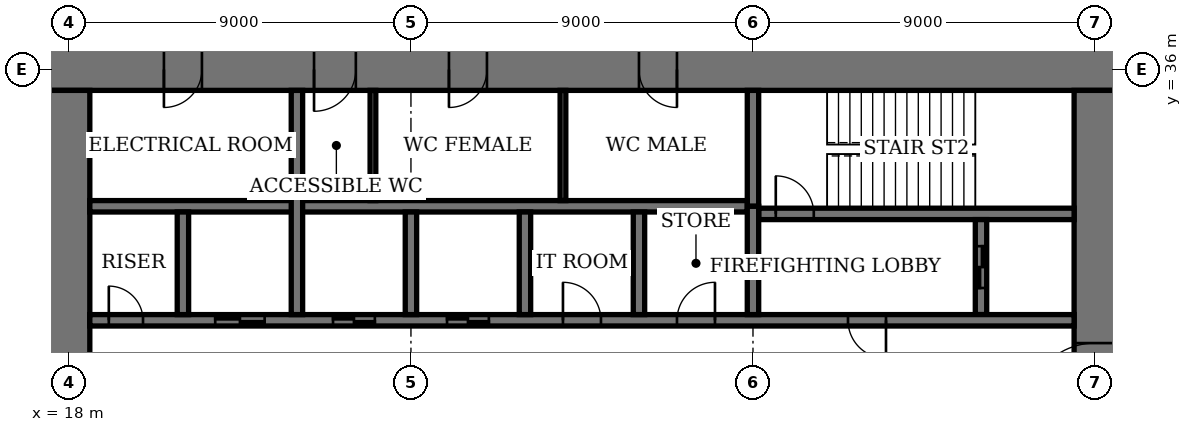
"""IFC4 building model, lengths in metres.
Left out: names, types, materials, properties, quantities, classifications, styles, units other than length and angle.
Written with IfcOpenShell. Run it as: python <this file> out.ifc"""

import sys

from ifc_helpers import new_model, si_unit, direction, frame, frame_2d, origin, place, context, subcontext, project, spatial, rectangle, extrude, element, fill, save


model = new_model("IFC4")
c1 = context("Model", 3, precision=1e-05, world=origin(), true_north=direction((0.0, 1.0)))
c2 = subcontext(c1, "Body", "Model", "MODEL_VIEW")
j1 = project(units=[si_unit("LENGTHUNIT", "METRE"), si_unit("PLANEANGLEUNIT", "RADIAN")], contexts=[c1])
p1 = place(None, origin())
s1 = spatial("IfcSite", under=j1, at=p1, CompositionType="ELEMENT")
p2 = place(p1, origin())
s2 = spatial("IfcBuilding", under=s1, at=p2, CompositionType="ELEMENT")
p3 = place(p2, frame((0.0, 0.0, 202.2)))
s3 = spatial("IfcBuildingStorey", under=s2, at=p3, CompositionType="ELEMENT", Elevation=202.2)
p4 = place(p3, frame((45.55, 36.0, 0.0), z_axis=(0.0, 0.0, 1.0), x_axis=(-1.0, 0.0, 0.0)))
e1 = element("IfcWall", 1, at=p4, inside=s3, PredefinedType="SHEAR", context=c2, shape_type="SweptSolid", body=[
    extrude(rectangle(XDim=28.1, YDim=1.1, at=frame_2d((14.05, 0.0))), origin(), (0.0, 0.0, 1.0), 4.0),
])
p5 = place(p4, frame((11.55, 0.0, 0.0)))
e2 = element("IfcOpeningElement", 2, at=p5, cuts=e1, PredefinedType="OPENING", context=c2, shape_type="SweptSolid", body=[
    extrude(rectangle(XDim=1.0, YDim=2.4, at=frame_2d((0.5, 1.2))), frame((0.0, 0.56, 0.0), z_axis=(0.0, -1.0, 0.0), x_axis=(1.0, 0.0, 0.0)), (0.0, 0.0, 1.0), 1.12),
])
p6 = place(p4, frame((16.55, 0.0, 0.0)))
e3 = element("IfcOpeningElement", 3, at=p6, cuts=e1, PredefinedType="OPENING", context=c2, shape_type="SweptSolid", body=[
    extrude(rectangle(XDim=1.0, YDim=2.4, at=frame_2d((0.5, 1.2))), frame((0.0, 0.56, 0.0), z_axis=(0.0, -1.0, 0.0), x_axis=(1.0, 0.0, 0.0)), (0.0, 0.0, 1.0), 1.12),
])
p7 = place(p4, frame((20.0, 0.0, 0.0)))
e4 = element("IfcOpeningElement", 4, at=p7, cuts=e1, PredefinedType="OPENING", context=c2, shape_type="SweptSolid", body=[
    extrude(rectangle(XDim=1.1, YDim=2.4, at=frame_2d((0.55, 1.2))), frame((0.0, 0.56, 0.0), z_axis=(0.0, -1.0, 0.0), x_axis=(1.0, 0.0, 0.0)), (0.0, 0.0, 1.0), 1.12),
])
p8 = place(p4, frame((24.05, 0.0, 0.0)))
e5 = element("IfcOpeningElement", 5, at=p8, cuts=e1, PredefinedType="OPENING", context=c2, shape_type="SweptSolid", body=[
    extrude(rectangle(XDim=1.0, YDim=2.4, at=frame_2d((0.5, 1.2))), frame((0.0, 0.56, 0.0), z_axis=(0.0, -1.0, 0.0), x_axis=(1.0, 0.0, 0.0)), (0.0, 0.0, 1.0), 1.12),
])
p9 = place(p3, frame((18.0, 35.45, 0.0), z_axis=(0.0, 0.0, 1.0), x_axis=(0.0, -1.0, 0.0)))
e6 = element("IfcWall", 6, at=p9, inside=s3, PredefinedType="SHEAR", context=c2, shape_type="SweptSolid", body=[
    extrude(rectangle(XDim=16.9, YDim=1.1, at=frame_2d((8.45, 0.0))), origin(), (0.0, 0.0, 1.0), 4.0),
])
p10 = place(p9, frame((8.45, 0.0, 0.0)))
e7 = element("IfcOpeningElement", 7, at=p10, cuts=e6, PredefinedType="OPENING", context=c2, shape_type="SweptSolid", body=[
    extrude(rectangle(XDim=1.8, YDim=2.4, at=frame_2d((0.9, 1.2))), frame((0.0, 0.56, 0.0), z_axis=(0.0, -1.0, 0.0), x_axis=(1.0, 0.0, 0.0)), (0.0, 0.0, 1.0), 1.12),
])
p11 = place(p3, frame((45.0, 18.55, 0.0), z_axis=(0.0, 0.0, 1.0), x_axis=(0.0, 1.0, 0.0)))
e8 = element("IfcWall", 8, at=p11, inside=s3, PredefinedType="SHEAR", context=c2, shape_type="SweptSolid", body=[
    extrude(rectangle(XDim=16.9, YDim=1.1, at=frame_2d((8.45, 0.0))), origin(), (0.0, 0.0, 1.0), 4.0),
])
p12 = place(p11, frame((8.45, 0.0, 0.0)))
e9 = element("IfcOpeningElement", 9, at=p12, cuts=e8, PredefinedType="OPENING", context=c2, shape_type="SweptSolid", body=[
    extrude(rectangle(XDim=1.8, YDim=2.4, at=frame_2d((0.9, 1.2))), frame((0.0, 0.56, 0.0), z_axis=(0.0, -1.0, 0.0), x_axis=(1.0, 0.0, 0.0)), (0.0, 0.0, 1.0), 1.12),
])
p13 = place(p3, frame((36.15, 32.2, 0.0), z_axis=(0.0, 0.0, 1.0), x_axis=(1.0, 0.0, 0.0)))
e10 = element("IfcWall", 10, at=p13, inside=s3, PredefinedType="SHEAR", context=c2, shape_type="SweptSolid", body=[
    extrude(rectangle(XDim=8.3, YDim=0.3, at=frame_2d((4.15, 0.0))), origin(), (0.0, 0.0, 1.0), 4.0),
])
p14 = place(p13, frame((0.45, 0.0, 0.0)))
e11 = element("IfcOpeningElement", 11, at=p14, cuts=e10, PredefinedType="OPENING", context=c2, shape_type="SweptSolid", body=[
    extrude(rectangle(XDim=1.0, YDim=2.4, at=frame_2d((0.5, 1.2))), frame((0.0, 0.16, 0.0), z_axis=(0.0, -1.0, 0.0), x_axis=(1.0, 0.0, 0.0)), (0.0, 0.0, 1.0), 0.32),
])
p15 = place(p3, frame((36.0, 32.4, 0.0), z_axis=(0.0, 0.0, 1.0), x_axis=(0.0, 1.0, 0.0)))
e12 = element("IfcWall", 12, at=p15, inside=s3, PredefinedType="SHEAR", context=c2, shape_type="SweptSolid", body=[
    extrude(rectangle(XDim=3.05, YDim=0.3, at=frame_2d((1.525, 0.0))), origin(), (0.0, 0.0, 1.0), 4.0),
])
p16 = place(p3, frame((42.0, 29.55, 0.0), z_axis=(0.0, 0.0, 1.0), x_axis=(0.0, 1.0, 0.0)))
e13 = element("IfcWall", 13, at=p16, inside=s3, PredefinedType="SHEAR", context=c2, shape_type="SweptSolid", body=[
    extrude(rectangle(XDim=2.5, YDim=0.3, at=frame_2d((1.25, 0.0))), origin(), (0.0, 0.0, 1.0), 4.0),
])
p17 = place(p16, frame((0.7, 0.0, 0.0)))
e14 = element("IfcOpeningElement", 14, at=p17, cuts=e13, PredefinedType="OPENING", context=c2, shape_type="SweptSolid", body=[
    extrude(rectangle(XDim=1.1, YDim=2.4, at=frame_2d((0.55, 1.2))), frame((0.0, 0.16, 0.0), z_axis=(0.0, -1.0, 0.0), x_axis=(1.0, 0.0, 0.0)), (0.0, 0.0, 1.0), 0.32),
])
p18 = place(p3, frame((18.55, 29.4, 0.0), z_axis=(0.0, 0.0, 1.0), x_axis=(1.0, 0.0, 0.0)))
e15 = element("IfcWall", 15, at=p18, inside=s3, PredefinedType="SHEAR", context=c2, shape_type="SweptSolid", body=[
    extrude(rectangle(XDim=25.9, YDim=0.3, at=frame_2d((12.95, 0.0))), origin(), (0.0, 0.0, 1.0), 4.0),
])
p19 = place(p18, frame((19.95, 0.0, 0.0)))
e16 = element("IfcOpeningElement", 16, at=p19, cuts=e15, PredefinedType="OPENING", context=c2, shape_type="SweptSolid", body=[
    extrude(rectangle(XDim=1.0, YDim=2.4, at=frame_2d((0.5, 1.2))), frame((0.0, 0.16, 0.0), z_axis=(0.0, -1.0, 0.0), x_axis=(1.0, 0.0, 0.0)), (0.0, 0.0, 1.0), 0.32),
])
p20 = place(p18, frame((0.5, 0.0, 0.0)))
e17 = element("IfcOpeningElement", 17, at=p20, cuts=e15, PredefinedType="OPENING", context=c2, shape_type="SweptSolid", body=[
    extrude(rectangle(XDim=0.9, YDim=2.1, at=frame_2d((0.45, 1.05))), frame((0.0, 0.16, 0.0), z_axis=(0.0, -1.0, 0.0), x_axis=(1.0, 0.0, 0.0)), (0.0, 0.0, 1.0), 0.32),
])
p21 = place(p18, frame((15.45, 0.0, 0.0)))
e18 = element("IfcOpeningElement", 18, at=p21, cuts=e15, PredefinedType="OPENING", context=c2, shape_type="SweptSolid", body=[
    extrude(rectangle(XDim=1.0, YDim=2.4, at=frame_2d((0.5, 1.2))), frame((0.0, 0.16, 0.0), z_axis=(0.0, -1.0, 0.0), x_axis=(1.0, 0.0, 0.0)), (0.0, 0.0, 1.0), 0.32),
])
p22 = place(p18, frame((12.45, 0.0, 0.0)))
e19 = element("IfcOpeningElement", 19, at=p22, cuts=e15, PredefinedType="OPENING", context=c2, shape_type="SweptSolid", body=[
    extrude(rectangle(XDim=1.0, YDim=2.4, at=frame_2d((0.5, 1.2))), frame((0.0, 0.16, 0.0), z_axis=(0.0, -1.0, 0.0), x_axis=(1.0, 0.0, 0.0)), (0.0, 0.0, 1.0), 0.32),
])
p23 = place(p18, frame((9.4, 0.0, 0.0)))
e20 = element("IfcOpeningElement", 20, at=p23, cuts=e15, PredefinedType="OPENING", context=c2, shape_type="SweptSolid", body=[
    extrude(rectangle(XDim=1.1, YDim=2.4, at=frame_2d((0.55, 1.2))), frame((0.0, 0.16, 0.0), z_axis=(0.0, -1.0, 0.0), x_axis=(1.0, 0.0, 0.0)), (0.0, 0.0, 1.0), 0.32),
])
p24 = place(p18, frame((6.4, 0.0, 0.0)))
e21 = element("IfcOpeningElement", 21, at=p24, cuts=e15, PredefinedType="OPENING", context=c2, shape_type="SweptSolid", body=[
    extrude(rectangle(XDim=1.1, YDim=2.4, at=frame_2d((0.55, 1.2))), frame((0.0, 0.16, 0.0), z_axis=(0.0, -1.0, 0.0), x_axis=(1.0, 0.0, 0.0)), (0.0, 0.0, 1.0), 0.32),
])
p25 = place(p18, frame((3.3, 0.0, 0.0)))
e22 = element("IfcOpeningElement", 22, at=p25, cuts=e15, PredefinedType="OPENING", context=c2, shape_type="SweptSolid", body=[
    extrude(rectangle(XDim=1.3, YDim=2.4, at=frame_2d((0.65, 1.2))), frame((0.0, 0.16, 0.0), z_axis=(0.0, -1.0, 0.0), x_axis=(1.0, 0.0, 0.0)), (0.0, 0.0, 1.0), 0.32),
])
p26 = place(p3, frame((18.55, 32.4, 0.0), z_axis=(0.0, 0.0, 1.0), x_axis=(1.0, 0.0, 0.0)))
e23 = element("IfcWall", 23, at=p26, inside=s3, PredefinedType="SHEAR", context=c2, shape_type="SweptSolid", body=[
    extrude(rectangle(XDim=17.3, YDim=0.3, at=frame_2d((8.65, 0.0))), origin(), (0.0, 0.0, 1.0), 4.0),
])
for number, where, z_axis, x_axis in (
    (24, (33.0, 29.55, 0.0), (0.0, 0.0, 1.0), (0.0, 1.0, 0.0)),
    (25, (30.0, 29.55, 0.0), (0.0, 0.0, 1.0), (0.0, 1.0, 0.0)),
    (26, (27.0, 29.55, 0.0), (0.0, 0.0, 1.0), (0.0, 1.0, 0.0)),
):
    element("IfcWall", number, at=place(p3, frame(where, z_axis=z_axis, x_axis=x_axis)), inside=s3, PredefinedType="SHEAR", context=c2, shape_type="SweptSolid", body=[
        extrude(rectangle(XDim=2.7, YDim=0.3, at=frame_2d((1.35, 0.0))), origin(), (0.0, 0.0, 1.0), 4.0),
    ])
p27 = place(p3, frame((24.0, 29.55, 0.0), z_axis=(0.0, 0.0, 1.0), x_axis=(0.0, 1.0, 0.0)))
e27 = element("IfcWall", 27, at=p27, inside=s3, PredefinedType="SHEAR", context=c2, shape_type="SweptSolid", body=[
    extrude(rectangle(XDim=5.9, YDim=0.3, at=frame_2d((2.95, 0.0))), origin(), (0.0, 0.0, 1.0), 4.0),
])
p28 = place(p3, frame((21.0, 29.55, 0.0), z_axis=(0.0, 0.0, 1.0), x_axis=(0.0, 1.0, 0.0)))
e28 = element("IfcWall", 28, at=p28, inside=s3, PredefinedType="SHEAR", context=c2, shape_type="SweptSolid", body=[
    extrude(rectangle(XDim=2.7, YDim=0.3, at=frame_2d((1.35, 0.0))), origin(), (0.0, 0.0, 1.0), 4.0),
])
p29 = place(p3, frame((36.0, 29.55, 0.0), z_axis=(0.0, 0.0, 1.0), x_axis=(0.0, 1.0, 0.0)))
e29 = element("IfcWall", 29, at=p29, inside=s3, PredefinedType="SHEAR", context=c2, shape_type="SweptSolid", body=[
    extrude(rectangle(XDim=2.85, YDim=0.3, at=frame_2d((1.425, 0.0))), origin(), (0.0, 0.0, 1.0), 4.0),
])
for number, where, z_axis, x_axis in (
    (30, (31.0, 32.55, 0.0), (0.0, 0.0, 1.0), (0.0, 1.0, 0.0)),
    (31, (26.0, 32.55, 0.0), (0.0, 0.0, 1.0), (0.0, 1.0, 0.0)),
):
    element("IfcWall", number, at=place(p3, frame(where, z_axis=z_axis, x_axis=x_axis)), inside=s3, PredefinedType="PARTITIONING", context=c2, shape_type="SweptSolid", body=[
        extrude(rectangle(XDim=2.9, YDim=0.15, at=frame_2d((1.45, 0.0))), origin(), (0.0, 0.0, 1.0), 3.75),
    ])
p30 = place(p12, origin())
e32 = element("IfcDoor", 32, at=p30, inside=s3, OperationType="DOUBLE_DOOR_DOUBLE_SWING", PredefinedType="DOOR", context=c2, shape_type="SweptSolid", body=[
    extrude(rectangle(XDim=1.8, YDim=2.4, at=frame_2d((0.9, 1.2))), frame((0.0, 0.03, 0.0), z_axis=(0.0, -1.0, 0.0), x_axis=(1.0, 0.0, 0.0)), (0.0, 0.0, 1.0), 0.06),
    extrude(rectangle(XDim=0.04, YDim=2.4, at=frame_2d((0.02, 1.2))), frame((0.0, 0.55, 0.0), z_axis=(0.0, -1.0, 0.0), x_axis=(1.0, 0.0, 0.0)), (0.0, 0.0, 1.0), 1.1),
    extrude(rectangle(XDim=0.04, YDim=2.4, at=frame_2d((1.78, 1.2))), frame((0.0, 0.55, 0.0), z_axis=(0.0, -1.0, 0.0), x_axis=(1.0, 0.0, 0.0)), (0.0, 0.0, 1.0), 1.1),
    extrude(rectangle(XDim=1.8, YDim=0.04, at=frame_2d((0.9, 2.38))), frame((0.0, 0.55, 0.0), z_axis=(0.0, -1.0, 0.0), x_axis=(1.0, 0.0, 0.0)), (0.0, 0.0, 1.0), 1.1),
])
fill(e9, e32)
p31 = place(p5, origin())
e33 = element("IfcDoor", 33, at=p31, inside=s3, OperationType="SINGLE_SWING_RIGHT", PredefinedType="DOOR", context=c2, shape_type="SweptSolid", body=[
    extrude(rectangle(XDim=1.0, YDim=2.4, at=frame_2d((0.5, 1.2))), frame((0.0, 0.025, 0.0), z_axis=(0.0, -1.0, 0.0), x_axis=(1.0, 0.0, 0.0)), (0.0, 0.0, 1.0), 0.05),
    extrude(rectangle(XDim=0.04, YDim=2.4, at=frame_2d((0.02, 1.2))), frame((0.0, 0.4, 0.0), z_axis=(0.0, -1.0, 0.0), x_axis=(1.0, 0.0, 0.0)), (0.0, 0.0, 1.0), 0.8),
    extrude(rectangle(XDim=0.04, YDim=2.4, at=frame_2d((0.98, 1.2))), frame((0.0, 0.4, 0.0), z_axis=(0.0, -1.0, 0.0), x_axis=(1.0, 0.0, 0.0)), (0.0, 0.0, 1.0), 0.8),
    extrude(rectangle(XDim=1.0, YDim=0.04, at=frame_2d((0.5, 2.38))), frame((0.0, 0.4, 0.0), z_axis=(0.0, -1.0, 0.0), x_axis=(1.0, 0.0, 0.0)), (0.0, 0.0, 1.0), 0.8),
])
fill(e2, e33)
p32 = place(p6, origin())
e34 = element("IfcDoor", 34, at=p32, inside=s3, OperationType="SINGLE_SWING_LEFT", PredefinedType="DOOR", context=c2, shape_type="SweptSolid", body=[
    extrude(rectangle(XDim=1.0, YDim=2.4, at=frame_2d((0.5, 1.2))), frame((0.0, 0.025, 0.0), z_axis=(0.0, -1.0, 0.0), x_axis=(1.0, 0.0, 0.0)), (0.0, 0.0, 1.0), 0.05),
    extrude(rectangle(XDim=0.04, YDim=2.4, at=frame_2d((0.02, 1.2))), frame((0.0, 0.4, 0.0), z_axis=(0.0, -1.0, 0.0), x_axis=(1.0, 0.0, 0.0)), (0.0, 0.0, 1.0), 0.8),
    extrude(rectangle(XDim=0.04, YDim=2.4, at=frame_2d((0.98, 1.2))), frame((0.0, 0.4, 0.0), z_axis=(0.0, -1.0, 0.0), x_axis=(1.0, 0.0, 0.0)), (0.0, 0.0, 1.0), 0.8),
    extrude(rectangle(XDim=1.0, YDim=0.04, at=frame_2d((0.5, 2.38))), frame((0.0, 0.4, 0.0), z_axis=(0.0, -1.0, 0.0), x_axis=(1.0, 0.0, 0.0)), (0.0, 0.0, 1.0), 0.8),
])
fill(e3, e34)
p33 = place(p7, origin())
e35 = element("IfcDoor", 35, at=p33, inside=s3, OperationType="SINGLE_SWING_LEFT", PredefinedType="DOOR", context=c2, shape_type="SweptSolid", body=[
    extrude(rectangle(XDim=1.1, YDim=2.4, at=frame_2d((0.55, 1.2))), frame((0.0, 0.025, 0.0), z_axis=(0.0, -1.0, 0.0), x_axis=(1.0, 0.0, 0.0)), (0.0, 0.0, 1.0), 0.05),
    extrude(rectangle(XDim=0.04, YDim=2.4, at=frame_2d((0.02, 1.2))), frame((0.0, 0.44, 0.0), z_axis=(0.0, -1.0, 0.0), x_axis=(1.0, 0.0, 0.0)), (0.0, 0.0, 1.0), 0.88),
    extrude(rectangle(XDim=0.04, YDim=2.4, at=frame_2d((1.08, 1.2))), frame((0.0, 0.44, 0.0), z_axis=(0.0, -1.0, 0.0), x_axis=(1.0, 0.0, 0.0)), (0.0, 0.0, 1.0), 0.88),
    extrude(rectangle(XDim=1.1, YDim=0.04, at=frame_2d((0.55, 2.38))), frame((0.0, 0.44, 0.0), z_axis=(0.0, -1.0, 0.0), x_axis=(1.0, 0.0, 0.0)), (0.0, 0.0, 1.0), 0.88),
])
fill(e4, e35)
p34 = place(p8, origin())
e36 = element("IfcDoor", 36, at=p34, inside=s3, OperationType="SINGLE_SWING_LEFT", PredefinedType="DOOR", context=c2, shape_type="SweptSolid", body=[
    extrude(rectangle(XDim=1.0, YDim=2.4, at=frame_2d((0.5, 1.2))), frame((0.0, 0.025, 0.0), z_axis=(0.0, -1.0, 0.0), x_axis=(1.0, 0.0, 0.0)), (0.0, 0.0, 1.0), 0.05),
    extrude(rectangle(XDim=0.04, YDim=2.4, at=frame_2d((0.02, 1.2))), frame((0.0, 0.4, 0.0), z_axis=(0.0, -1.0, 0.0), x_axis=(1.0, 0.0, 0.0)), (0.0, 0.0, 1.0), 0.8),
    extrude(rectangle(XDim=0.04, YDim=2.4, at=frame_2d((0.98, 1.2))), frame((0.0, 0.4, 0.0), z_axis=(0.0, -1.0, 0.0), x_axis=(1.0, 0.0, 0.0)), (0.0, 0.0, 1.0), 0.8),
    extrude(rectangle(XDim=1.0, YDim=0.04, at=frame_2d((0.5, 2.38))), frame((0.0, 0.4, 0.0), z_axis=(0.0, -1.0, 0.0), x_axis=(1.0, 0.0, 0.0)), (0.0, 0.0, 1.0), 0.8),
])
fill(e5, e36)
p35 = place(p14, origin())
e37 = element("IfcDoor", 37, at=p35, inside=s3, OperationType="SINGLE_SWING_RIGHT", PredefinedType="DOOR", context=c2, shape_type="SweptSolid", body=[
    extrude(rectangle(XDim=1.0, YDim=2.4, at=frame_2d((0.5, 1.2))), frame((0.0, 0.03, 0.0), z_axis=(0.0, -1.0, 0.0), x_axis=(1.0, 0.0, 0.0)), (0.0, 0.0, 1.0), 0.06),
])
fill(e11, e37)
p36 = place(p19, origin())
e38 = element("IfcDoor", 38, at=p36, inside=s3, OperationType="SINGLE_SWING_RIGHT", PredefinedType="DOOR", context=c2, shape_type="SweptSolid", body=[
    extrude(rectangle(XDim=1.0, YDim=2.4, at=frame_2d((0.5, 1.2))), frame((0.0, 0.03, 0.0), z_axis=(0.0, -1.0, 0.0), x_axis=(1.0, 0.0, 0.0)), (0.0, 0.0, 1.0), 0.06),
])
fill(e16, e38)
p37 = place(p20, origin())
e39 = element("IfcDoor", 39, at=p37, inside=s3, OperationType="SINGLE_SWING_RIGHT", PredefinedType="DOOR", context=c2, shape_type="SweptSolid", body=[
    extrude(rectangle(XDim=0.9, YDim=2.1, at=frame_2d((0.45, 1.05))), frame((0.0, 0.03, 0.0), z_axis=(0.0, -1.0, 0.0), x_axis=(1.0, 0.0, 0.0)), (0.0, 0.0, 1.0), 0.06),
])
fill(e17, e39)
p38 = place(p21, origin())
e40 = element("IfcDoor", 40, at=p38, inside=s3, OperationType="SINGLE_SWING_LEFT", PredefinedType="DOOR", context=c2, shape_type="SweptSolid", body=[
    extrude(rectangle(XDim=1.0, YDim=2.4, at=frame_2d((0.5, 1.2))), frame((0.0, 0.03, 0.0), z_axis=(0.0, -1.0, 0.0), x_axis=(1.0, 0.0, 0.0)), (0.0, 0.0, 1.0), 0.06),
])
fill(e18, e40)
p39 = place(p22, origin())
e41 = element("IfcDoor", 41, at=p39, inside=s3, OperationType="SINGLE_SWING_RIGHT", PredefinedType="DOOR", context=c2, shape_type="SweptSolid", body=[
    extrude(rectangle(XDim=1.0, YDim=2.4, at=frame_2d((0.5, 1.2))), frame((0.0, 0.03, 0.0), z_axis=(0.0, -1.0, 0.0), x_axis=(1.0, 0.0, 0.0)), (0.0, 0.0, 1.0), 0.06),
])
fill(e19, e41)
p40 = place(p23, origin())
e42 = element("IfcDoor", 42, at=p40, inside=s3, OperationType="DOUBLE_DOOR_SLIDING", PredefinedType="DOOR", context=c2, shape_type="SweptSolid", body=[
    extrude(rectangle(XDim=1.1, YDim=2.4, at=frame_2d((0.55, 1.2))), frame((0.0, 0.02, 0.0), z_axis=(0.0, -1.0, 0.0), x_axis=(1.0, 0.0, 0.0)), (0.0, 0.0, 1.0), 0.04),
])
fill(e20, e42)
p41 = place(p24, origin())
e43 = element("IfcDoor", 43, at=p41, inside=s3, OperationType="DOUBLE_DOOR_SLIDING", PredefinedType="DOOR", context=c2, shape_type="SweptSolid", body=[
    extrude(rectangle(XDim=1.1, YDim=2.4, at=frame_2d((0.55, 1.2))), frame((0.0, 0.02, 0.0), z_axis=(0.0, -1.0, 0.0), x_axis=(1.0, 0.0, 0.0)), (0.0, 0.0, 1.0), 0.04),
])
fill(e21, e43)
p42 = place(p25, origin())
e44 = element("IfcDoor", 44, at=p42, inside=s3, OperationType="DOUBLE_DOOR_SLIDING", PredefinedType="DOOR", context=c2, shape_type="SweptSolid", body=[
    extrude(rectangle(XDim=1.3, YDim=2.4, at=frame_2d((0.65, 1.2))), frame((0.0, 0.02, 0.0), z_axis=(0.0, -1.0, 0.0), x_axis=(1.0, 0.0, 0.0)), (0.0, 0.0, 1.0), 0.04),
])
fill(e22, e44)
p43 = place(p17, origin())
e45 = element("IfcDoor", 45, at=p43, inside=s3, OperationType="DOUBLE_DOOR_SLIDING", PredefinedType="DOOR", context=c2, shape_type="SweptSolid", body=[
    extrude(rectangle(XDim=1.1, YDim=2.4, at=frame_2d((0.55, 1.2))), frame((0.0, 0.03, 0.0), z_axis=(0.0, -1.0, 0.0), x_axis=(1.0, 0.0, 0.0)), (0.0, 0.0, 1.0), 0.06),
])
fill(e14, e45)
save(model, sys.argv[1])
